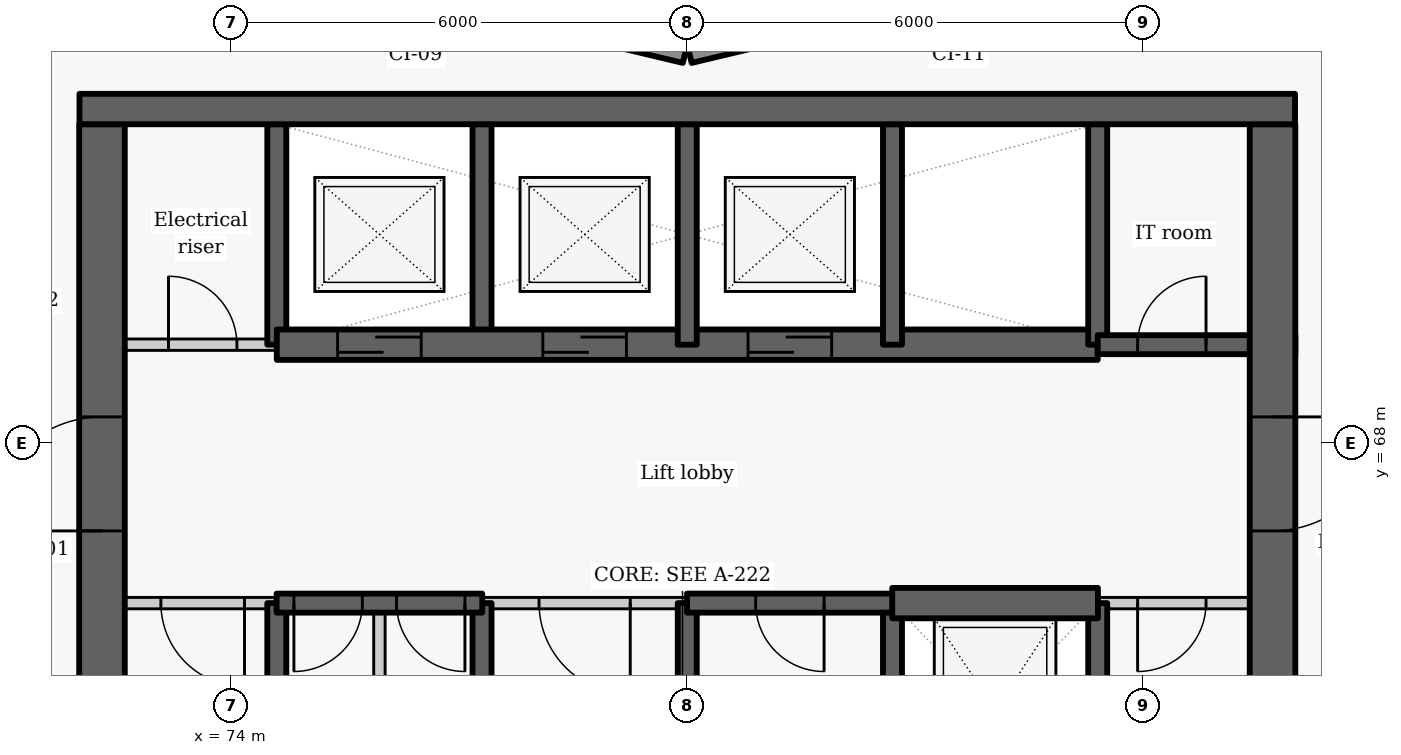
"""IFC4 building model, lengths in metres.
Left out: names, types, materials, properties, quantities, classifications, styles, units other than length and angle.
Written with IfcOpenShell. Run it as: python <this file> out.ifc"""

import sys

from ifc_helpers import new_model, si_unit, direction, frame, frame_2d, origin, place, context, subcontext, project, spatial, rectangle, extrude, element, fill, save


model = new_model("IFC4")
c1 = context("Model", 3, precision=1e-05, world=origin(), true_north=direction((0.0, 1.0)))
c2 = subcontext(c1, "Body", "Model", "MODEL_VIEW")
j1 = project(units=[si_unit("LENGTHUNIT", "METRE"), si_unit("PLANEANGLEUNIT", "RADIAN")], contexts=[c1])
p1 = place(None, origin())
s1 = spatial("IfcSite", under=j1, at=p1, CompositionType="ELEMENT")
p2 = place(p1, origin())
s2 = spatial("IfcBuilding", under=s1, at=p2, CompositionType="ELEMENT")
p3 = place(p2, frame((0.0, 0.0, 117.3)))
s3 = spatial("IfcBuildingStorey", under=s2, at=p3, CompositionType="ELEMENT", Elevation=117.3)
for number, where, z_axis, x_axis in (
    (1, (83.186, 73.881, 0.0), (0.0, 0.0, 1.0), (-0.973, -0.232, 0.0)),
    (2, (79.971, 73.128, 0.0), (0.0, 0.0, 1.0), (-0.973, 0.232, 0.0)),
):
    element("IfcWall", number, at=place(p3, frame(where, z_axis=z_axis, x_axis=x_axis)), inside=s3, PredefinedType="SOLIDWALL", context=c2, shape_type="SweptSolid", body=[
        extrude(rectangle(XDim=3.246, YDim=0.25, at=frame_2d((1.623, 0.0))), origin(), (0.0, 0.0, 1.0), 2.05),
    ])
p4 = place(p3, frame((74.6, 63.1, -0.275), z_axis=(0.0, 0.0, 1.0), x_axis=(0.0, 1.0, 0.0)))
e3 = element("IfcWall", 3, at=p4, inside=s3, PredefinedType="SHEAR", context=c2, shape_type="SweptSolid", body=[
    extrude(rectangle(XDim=2.8, YDim=0.25, at=frame_2d((1.4, 0.0))), origin(), (0.0, 0.0, 1.0), 3.225),
])
p5 = place(p3, frame((74.6, 69.3, -0.275), z_axis=(0.0, 0.0, 1.0), x_axis=(0.0, 1.0, 0.0)))
e4 = element("IfcWall", 4, at=p5, inside=s3, PredefinedType="SHEAR", context=c2, shape_type="SweptSolid", body=[
    extrude(rectangle(XDim=2.9, YDim=0.25, at=frame_2d((1.45, 0.0))), origin(), (0.0, 0.0, 1.0), 3.225),
])
p6 = place(p3, frame((72.0, 69.3, 0.0), z_axis=(0.0, 0.0, 1.0), x_axis=(1.0, 0.0, 0.0)))
e5 = element("IfcWall", 5, at=p6, inside=s3, PredefinedType="PARTITIONING", context=c2, shape_type="SweptSolid", body=[
    extrude(rectangle(XDim=2.6, YDim=0.15, at=frame_2d((1.3, 0.0))), origin(), (0.0, 0.0, 1.0), 2.95),
])
p7 = place(p6, frame((1.175, 0.0, 0.0)))
e6 = element("IfcOpeningElement", 6, at=p7, cuts=e5, PredefinedType="OPENING", context=c2, shape_type="SweptSolid", body=[
    extrude(rectangle(XDim=0.9, YDim=2.1, at=frame_2d((0.45, 1.05))), frame((0.0, 0.085, 0.0), z_axis=(0.0, -1.0, 0.0), x_axis=(1.0, 0.0, 0.0)), (0.0, 0.0, 1.0), 0.17),
])
p8 = place(p3, frame((72.3, 63.1, -0.275), z_axis=(0.0, 0.0, 1.0), x_axis=(0.0, 1.0, 0.0)))
e7 = element("IfcWall", 7, at=p8, inside=s3, PredefinedType="SHEAR", context=c2, shape_type="SweptSolid", body=[
    extrude(rectangle(XDim=9.1, YDim=0.6, at=frame_2d((4.55, 0.0))), origin(), (0.0, 0.0, 1.0), 3.225),
])
p9 = place(p8, frame((3.75, 0.0, 0.275)))
e8 = element("IfcOpeningElement", 8, at=p9, cuts=e7, PredefinedType="OPENING", context=c2, shape_type="SweptSolid", body=[
    extrude(rectangle(XDim=1.5, YDim=2.1, at=frame_2d((0.75, 1.05))), frame((0.0, 0.31, 0.0), z_axis=(0.0, -1.0, 0.0), x_axis=(1.0, 0.0, 0.0)), (0.0, 0.0, 1.0), 0.62),
])
p10 = place(p3, frame((77.3, 63.1, -0.275), z_axis=(0.0, 0.0, 1.0), x_axis=(0.0, 1.0, 0.0)))
e9 = element("IfcWall", 9, at=p10, inside=s3, PredefinedType="SHEAR", context=c2, shape_type="SweptSolid", body=[
    extrude(rectangle(XDim=2.8, YDim=0.25, at=frame_2d((1.4, 0.0))), origin(), (0.0, 0.0, 1.0), 3.225),
])
p11 = place(p3, frame((77.3, 69.3, -0.275), z_axis=(0.0, 0.0, 1.0), x_axis=(0.0, 1.0, 0.0)))
e10 = element("IfcWall", 10, at=p11, inside=s3, PredefinedType="SHEAR", context=c2, shape_type="SweptSolid", body=[
    extrude(rectangle(XDim=2.9, YDim=0.25, at=frame_2d((1.45, 0.0))), origin(), (0.0, 0.0, 1.0), 3.225),
])
p12 = place(p3, frame((74.6, 69.3, -0.275), z_axis=(0.0, 0.0, 1.0), x_axis=(1.0, 0.0, 0.0)))
e11 = element("IfcWall", 11, at=p12, inside=s3, PredefinedType="SHEAR", context=c2, shape_type="SweptSolid", body=[
    extrude(rectangle(XDim=10.8, YDim=0.4, at=frame_2d((5.4, 0.0))), origin(), (0.0, 0.0, 1.0), 3.225),
])
p13 = place(p12, frame((0.8, 0.0, 0.275)))
e12 = element("IfcOpeningElement", 12, at=p13, cuts=e11, PredefinedType="OPENING", context=c2, shape_type="SweptSolid", body=[
    extrude(rectangle(XDim=1.1, YDim=2.1, at=frame_2d((0.55, 1.05))), frame((0.0, 0.21, 0.0), z_axis=(0.0, -1.0, 0.0), x_axis=(1.0, 0.0, 0.0)), (0.0, 0.0, 1.0), 0.42),
])
p14 = place(p12, frame((3.5, 0.0, 0.275)))
e13 = element("IfcOpeningElement", 13, at=p14, cuts=e11, PredefinedType="OPENING", context=c2, shape_type="SweptSolid", body=[
    extrude(rectangle(XDim=1.1, YDim=2.1, at=frame_2d((0.55, 1.05))), frame((0.0, 0.21, 0.0), z_axis=(0.0, -1.0, 0.0), x_axis=(1.0, 0.0, 0.0)), (0.0, 0.0, 1.0), 0.42),
])
p15 = place(p12, frame((6.2, 0.0, 0.275)))
e14 = element("IfcOpeningElement", 14, at=p15, cuts=e11, PredefinedType="OPENING", context=c2, shape_type="SweptSolid", body=[
    extrude(rectangle(XDim=1.1, YDim=2.1, at=frame_2d((0.55, 1.05))), frame((0.0, 0.21, 0.0), z_axis=(0.0, -1.0, 0.0), x_axis=(1.0, 0.0, 0.0)), (0.0, 0.0, 1.0), 0.42),
])
p16 = place(p3, frame((80.0, 63.1, -0.275), z_axis=(0.0, 0.0, 1.0), x_axis=(0.0, 1.0, 0.0)))
e15 = element("IfcWall", 15, at=p16, inside=s3, PredefinedType="SHEAR", context=c2, shape_type="SweptSolid", body=[
    extrude(rectangle(XDim=2.8, YDim=0.25, at=frame_2d((1.4, 0.0))), origin(), (0.0, 0.0, 1.0), 3.225),
])
p17 = place(p3, frame((80.0, 69.3, -0.275), z_axis=(0.0, 0.0, 1.0), x_axis=(0.0, 1.0, 0.0)))
e16 = element("IfcWall", 16, at=p17, inside=s3, PredefinedType="SHEAR", context=c2, shape_type="SweptSolid", body=[
    extrude(rectangle(XDim=2.9, YDim=0.25, at=frame_2d((1.45, 0.0))), origin(), (0.0, 0.0, 1.0), 3.225),
])
p18 = place(p3, frame((82.7, 63.1, -0.275), z_axis=(0.0, 0.0, 1.0), x_axis=(0.0, 1.0, 0.0)))
e17 = element("IfcWall", 17, at=p18, inside=s3, PredefinedType="SHEAR", context=c2, shape_type="SweptSolid", body=[
    extrude(rectangle(XDim=2.8, YDim=0.25, at=frame_2d((1.4, 0.0))), origin(), (0.0, 0.0, 1.0), 3.225),
])
p19 = place(p3, frame((82.7, 69.3, -0.275), z_axis=(0.0, 0.0, 1.0), x_axis=(0.0, 1.0, 0.0)))
e18 = element("IfcWall", 18, at=p19, inside=s3, PredefinedType="SHEAR", context=c2, shape_type="SweptSolid", body=[
    extrude(rectangle(XDim=2.9, YDim=0.25, at=frame_2d((1.45, 0.0))), origin(), (0.0, 0.0, 1.0), 3.225),
])
p20 = place(p3, frame((85.4, 63.1, -0.275), z_axis=(0.0, 0.0, 1.0), x_axis=(0.0, 1.0, 0.0)))
e19 = element("IfcWall", 19, at=p20, inside=s3, PredefinedType="SHEAR", context=c2, shape_type="SweptSolid", body=[
    extrude(rectangle(XDim=2.8, YDim=0.25, at=frame_2d((1.4, 0.0))), origin(), (0.0, 0.0, 1.0), 3.225),
])
p21 = place(p3, frame((85.4, 69.3, -0.275), z_axis=(0.0, 0.0, 1.0), x_axis=(0.0, 1.0, 0.0)))
e20 = element("IfcWall", 20, at=p21, inside=s3, PredefinedType="SHEAR", context=c2, shape_type="SweptSolid", body=[
    extrude(rectangle(XDim=2.9, YDim=0.25, at=frame_2d((1.45, 0.0))), origin(), (0.0, 0.0, 1.0), 3.225),
])
p22 = place(p3, frame((85.4, 69.3, -0.275), z_axis=(0.0, 0.0, 1.0), x_axis=(1.0, 0.0, 0.0)))
e21 = element("IfcWall", 21, at=p22, inside=s3, PredefinedType="SHEAR", context=c2, shape_type="SweptSolid", body=[
    extrude(rectangle(XDim=2.6, YDim=0.25, at=frame_2d((1.3, 0.0))), origin(), (0.0, 0.0, 1.0), 3.225),
])
p23 = place(p22, frame((0.525, 0.0, 0.275)))
e22 = element("IfcOpeningElement", 22, at=p23, cuts=e21, PredefinedType="OPENING", context=c2, shape_type="SweptSolid", body=[
    extrude(rectangle(XDim=0.9, YDim=2.1, at=frame_2d((0.45, 1.05))), frame((0.0, 0.135, 0.0), z_axis=(0.0, -1.0, 0.0), x_axis=(1.0, 0.0, 0.0)), (0.0, 0.0, 1.0), 0.27),
])
p24 = place(p3, frame((87.7, 72.2, -0.275), z_axis=(0.0, 0.0, 1.0), x_axis=(0.0, -1.0, 0.0)))
e23 = element("IfcWall", 23, at=p24, inside=s3, PredefinedType="SHEAR", context=c2, shape_type="SweptSolid", body=[
    extrude(rectangle(XDim=15.6, YDim=0.6, at=frame_2d((7.8, 0.0))), origin(), (0.0, 0.0, 1.0), 3.225),
])
p25 = place(p24, frame((3.85, 0.0, 0.275)))
e24 = element("IfcOpeningElement", 24, at=p25, cuts=e23, PredefinedType="OPENING", context=c2, shape_type="SweptSolid", body=[
    extrude(rectangle(XDim=1.5, YDim=2.1, at=frame_2d((0.75, 1.05))), frame((0.0, 0.31, 0.0), z_axis=(0.0, -1.0, 0.0), x_axis=(1.0, 0.0, 0.0)), (0.0, 0.0, 1.0), 0.62),
])
p26 = place(p24, frame((11.8, 0.0, 0.275)))
e25 = element("IfcOpeningElement", 25, at=p26, cuts=e23, PredefinedType="OPENING", context=c2, shape_type="SweptSolid", body=[
    extrude(rectangle(XDim=1.1, YDim=2.1, at=frame_2d((0.55, 1.05))), frame((0.0, 0.31, 0.0), z_axis=(0.0, -1.0, 0.0), x_axis=(1.0, 0.0, 0.0)), (0.0, 0.0, 1.0), 0.62),
])
p27 = place(p3, frame((74.603, 65.9, 0.0), z_axis=(0.0, 0.0, 1.0), x_axis=(-1.0, 0.0, 0.0)))
e26 = element("IfcWall", 26, at=p27, inside=s3, PredefinedType="PARTITIONING", context=c2, shape_type="SweptSolid", body=[
    extrude(rectangle(XDim=2.603, YDim=0.15, at=frame_2d((1.302, 0.0))), origin(), (0.0, 0.0, 1.0), 2.95),
])
p28 = place(p27, frame((0.428, 0.0, 0.0)))
e27 = element("IfcOpeningElement", 27, at=p28, cuts=e26, PredefinedType="OPENING", context=c2, shape_type="SweptSolid", body=[
    extrude(rectangle(XDim=1.1, YDim=2.1, at=frame_2d((0.55, 1.05))), frame((0.0, 0.085, 0.0), z_axis=(0.0, -1.0, 0.0), x_axis=(1.0, 0.0, 0.0)), (0.0, 0.0, 1.0), 0.17),
])
p29 = place(p3, frame((80.003, 65.9, 0.0), z_axis=(0.0, 0.0, 1.0), x_axis=(-1.0, 0.0, 0.0)))
e28 = element("IfcWall", 28, at=p29, inside=s3, PredefinedType="PARTITIONING", context=c2, shape_type="SweptSolid", body=[
    extrude(rectangle(XDim=2.706, YDim=0.15, at=frame_2d((1.353, 0.0))), origin(), (0.0, 0.0, 1.0), 2.95),
])
p30 = place(p29, frame((0.753, 0.0, 0.0)))
e29 = element("IfcOpeningElement", 29, at=p30, cuts=e28, PredefinedType="OPENING", context=c2, shape_type="SweptSolid", body=[
    extrude(rectangle(XDim=1.2, YDim=2.1, at=frame_2d((0.6, 1.05))), frame((0.0, 0.085, 0.0), z_axis=(0.0, -1.0, 0.0), x_axis=(1.0, 0.0, 0.0)), (0.0, 0.0, 1.0), 0.17),
])
p31 = place(p3, frame((88.0, 65.9, 0.0), z_axis=(0.0, 0.0, 1.0), x_axis=(-1.0, 0.0, 0.0)))
e30 = element("IfcWall", 30, at=p31, inside=s3, PredefinedType="PARTITIONING", context=c2, shape_type="SweptSolid", body=[
    extrude(rectangle(XDim=2.603, YDim=0.15, at=frame_2d((1.302, 0.0))), origin(), (0.0, 0.0, 1.0), 2.95),
])
p32 = place(p31, frame((1.175, 0.0, 0.0)))
e31 = element("IfcOpeningElement", 31, at=p32, cuts=e30, PredefinedType="OPENING", context=c2, shape_type="SweptSolid", body=[
    extrude(rectangle(XDim=0.9, YDim=2.1, at=frame_2d((0.45, 1.05))), frame((0.0, 0.085, 0.0), z_axis=(0.0, -1.0, 0.0), x_axis=(1.0, 0.0, 0.0)), (0.0, 0.0, 1.0), 0.17),
])
p33 = place(p3, frame((77.303, 65.9, -0.275), z_axis=(0.0, 0.0, 1.0), x_axis=(-1.0, 0.0, 0.0)))
e32 = element("IfcWall", 32, at=p33, inside=s3, PredefinedType="SHEAR", context=c2, shape_type="SweptSolid", body=[
    extrude(rectangle(XDim=2.706, YDim=0.25, at=frame_2d((1.353, 0.0))), origin(), (0.0, 0.0, 1.0), 3.225),
])
p34 = place(p33, frame((1.578, 0.0, 0.275)))
e33 = element("IfcOpeningElement", 33, at=p34, cuts=e32, PredefinedType="OPENING", context=c2, shape_type="SweptSolid", body=[
    extrude(rectangle(XDim=0.9, YDim=2.1, at=frame_2d((0.45, 1.05))), frame((0.0, 0.135, 0.0), z_axis=(0.0, -1.0, 0.0), x_axis=(1.0, 0.0, 0.0)), (0.0, 0.0, 1.0), 0.27),
])
p35 = place(p33, frame((0.228, 0.0, 0.275)))
e34 = element("IfcOpeningElement", 34, at=p35, cuts=e32, PredefinedType="OPENING", context=c2, shape_type="SweptSolid", body=[
    extrude(rectangle(XDim=0.9, YDim=2.1, at=frame_2d((0.45, 1.05))), frame((0.0, 0.135, 0.0), z_axis=(0.0, -1.0, 0.0), x_axis=(1.0, 0.0, 0.0)), (0.0, 0.0, 1.0), 0.27),
])
p36 = place(p3, frame((82.703, 65.9, -0.275), z_axis=(0.0, 0.0, 1.0), x_axis=(-1.0, 0.0, 0.0)))
e35 = element("IfcWall", 35, at=p36, inside=s3, PredefinedType="SHEAR", context=c2, shape_type="SweptSolid", body=[
    extrude(rectangle(XDim=2.706, YDim=0.25, at=frame_2d((1.353, 0.0))), origin(), (0.0, 0.0, 1.0), 3.225),
])
p37 = place(p36, frame((0.903, 0.0, 0.275)))
e36 = element("IfcOpeningElement", 36, at=p37, cuts=e35, PredefinedType="OPENING", context=c2, shape_type="SweptSolid", body=[
    extrude(rectangle(XDim=0.9, YDim=2.1, at=frame_2d((0.45, 1.05))), frame((0.0, 0.135, 0.0), z_axis=(0.0, -1.0, 0.0), x_axis=(1.0, 0.0, 0.0)), (0.0, 0.0, 1.0), 0.27),
])
p38 = place(p3, frame((82.697, 65.9, -0.275), z_axis=(0.0, 0.0, 1.0), x_axis=(1.0, 0.0, 0.0)))
e37 = element("IfcWall", 37, at=p38, inside=s3, PredefinedType="SHEAR", context=c2, shape_type="SweptSolid", body=[
    extrude(rectangle(XDim=2.706, YDim=0.4, at=frame_2d((1.353, 0.0))), origin(), (0.0, 0.0, 1.0), 3.225),
])
p39 = place(p3, frame((75.95, 63.1, 0.0), z_axis=(0.0, 0.0, 1.0), x_axis=(0.0, 1.0, 0.0)))
e38 = element("IfcWall", 38, at=p39, inside=s3, PredefinedType="PARTITIONING", context=c2, shape_type="SweptSolid", body=[
    extrude(rectangle(XDim=2.8, YDim=0.15, at=frame_2d((1.4, 0.0))), origin(), (0.0, 0.0, 1.0), 2.95),
])
p40 = place(p3, frame((72.004, 72.4, -0.275), z_axis=(0.0, 0.0, 1.0), x_axis=(1.0, 0.0, 0.0)))
e39 = element("IfcWall", 39, at=p40, inside=s3, PredefinedType="SHEAR", context=c2, shape_type="SweptSolid", body=[
    extrude(rectangle(XDim=15.992, YDim=0.4, at=frame_2d((7.996, 0.0))), origin(), (0.0, 0.0, 1.0), 3.225),
])
p41 = place(p7, origin())
e40 = element("IfcDoor", 40, at=p41, inside=s3, OperationType="SINGLE_SWING_LEFT", PredefinedType="DOOR", context=c2, shape_type="SweptSolid", body=[
    extrude(rectangle(XDim=0.9, YDim=2.1, at=frame_2d((0.45, 1.05))), frame((0.0, 0.025, 0.0), z_axis=(0.0, -1.0, 0.0), x_axis=(1.0, 0.0, 0.0)), (0.0, 0.0, 1.0), 0.05),
])
fill(e6, e40)
p42 = place(p13, origin())
e41 = element("IfcDoor", 41, at=p42, inside=s3, OperationType="SLIDING_TO_LEFT", PredefinedType="DOOR", context=c2, shape_type="SweptSolid", body=[
    extrude(rectangle(XDim=1.1, YDim=2.1, at=frame_2d((0.55, 1.05))), frame((0.0, 0.025, 0.0), z_axis=(0.0, -1.0, 0.0), x_axis=(1.0, 0.0, 0.0)), (0.0, 0.0, 1.0), 0.05),
])
fill(e12, e41)
p43 = place(p14, origin())
e42 = element("IfcDoor", 42, at=p43, inside=s3, OperationType="SLIDING_TO_LEFT", PredefinedType="DOOR", context=c2, shape_type="SweptSolid", body=[
    extrude(rectangle(XDim=1.1, YDim=2.1, at=frame_2d((0.55, 1.05))), frame((0.0, 0.025, 0.0), z_axis=(0.0, -1.0, 0.0), x_axis=(1.0, 0.0, 0.0)), (0.0, 0.0, 1.0), 0.05),
])
fill(e13, e42)
p44 = place(p15, origin())
e43 = element("IfcDoor", 43, at=p44, inside=s3, OperationType="SLIDING_TO_LEFT", PredefinedType="DOOR", context=c2, shape_type="SweptSolid", body=[
    extrude(rectangle(XDim=1.1, YDim=2.1, at=frame_2d((0.55, 1.05))), frame((0.0, 0.025, 0.0), z_axis=(0.0, -1.0, 0.0), x_axis=(1.0, 0.0, 0.0)), (0.0, 0.0, 1.0), 0.05),
])
fill(e14, e43)
p45 = place(p23, origin())
e44 = element("IfcDoor", 44, at=p45, inside=s3, OperationType="SINGLE_SWING_RIGHT", PredefinedType="DOOR", context=c2, shape_type="SweptSolid", body=[
    extrude(rectangle(XDim=0.9, YDim=2.1, at=frame_2d((0.45, 1.05))), frame((0.0, 0.025, 0.0), z_axis=(0.0, -1.0, 0.0), x_axis=(1.0, 0.0, 0.0)), (0.0, 0.0, 1.0), 0.05),
])
fill(e22, e44)
p46 = place(p28, origin())
e45 = element("IfcDoor", 45, at=p46, inside=s3, OperationType="SINGLE_SWING_LEFT", PredefinedType="DOOR", context=c2, shape_type="SweptSolid", body=[
    extrude(rectangle(XDim=1.1, YDim=2.1, at=frame_2d((0.55, 1.05))), frame((0.0, 0.025, 0.0), z_axis=(0.0, -1.0, 0.0), x_axis=(1.0, 0.0, 0.0)), (0.0, 0.0, 1.0), 0.05),
])
fill(e27, e45)
p47 = place(p34, origin())
e46 = element("IfcDoor", 46, at=p47, inside=s3, OperationType="SINGLE_SWING_RIGHT", PredefinedType="DOOR", context=c2, shape_type="SweptSolid", body=[
    extrude(rectangle(XDim=0.9, YDim=2.1, at=frame_2d((0.45, 1.05))), frame((0.0, 0.025, 0.0), z_axis=(0.0, -1.0, 0.0), x_axis=(1.0, 0.0, 0.0)), (0.0, 0.0, 1.0), 0.05),
])
fill(e33, e46)
p48 = place(p35, origin())
e47 = element("IfcDoor", 47, at=p48, inside=s3, OperationType="SINGLE_SWING_LEFT", PredefinedType="DOOR", context=c2, shape_type="SweptSolid", body=[
    extrude(rectangle(XDim=0.9, YDim=2.1, at=frame_2d((0.45, 1.05))), frame((0.0, 0.025, 0.0), z_axis=(0.0, -1.0, 0.0), x_axis=(1.0, 0.0, 0.0)), (0.0, 0.0, 1.0), 0.05),
])
fill(e34, e47)
p49 = place(p30, origin())
e48 = element("IfcDoor", 48, at=p49, inside=s3, OperationType="DOUBLE_DOOR_SINGLE_SWING", PredefinedType="DOOR", context=c2, shape_type="SweptSolid", body=[
    extrude(rectangle(XDim=1.2, YDim=2.1, at=frame_2d((0.6, 1.05))), frame((0.0, 0.025, 0.0), z_axis=(0.0, -1.0, 0.0), x_axis=(1.0, 0.0, 0.0)), (0.0, 0.0, 1.0), 0.05),
])
fill(e29, e48)
p50 = place(p37, origin())
e49 = element("IfcDoor", 49, at=p50, inside=s3, OperationType="SINGLE_SWING_LEFT", PredefinedType="DOOR", context=c2, shape_type="SweptSolid", body=[
    extrude(rectangle(XDim=0.9, YDim=2.1, at=frame_2d((0.45, 1.05))), frame((0.0, 0.025, 0.0), z_axis=(0.0, -1.0, 0.0), x_axis=(1.0, 0.0, 0.0)), (0.0, 0.0, 1.0), 0.05),
])
fill(e36, e49)
p51 = place(p32, origin())
e50 = element("IfcDoor", 50, at=p51, inside=s3, OperationType="SINGLE_SWING_RIGHT", PredefinedType="DOOR", context=c2, shape_type="SweptSolid", body=[
    extrude(rectangle(XDim=0.9, YDim=2.1, at=frame_2d((0.45, 1.05))), frame((0.0, 0.025, 0.0), z_axis=(0.0, -1.0, 0.0), x_axis=(1.0, 0.0, 0.0)), (0.0, 0.0, 1.0), 0.05),
])
fill(e31, e50)
p52 = place(p25, origin())
e51 = element("IfcDoor", 51, at=p52, inside=s3, OperationType="DOUBLE_DOOR_SINGLE_SWING", PredefinedType="DOOR", context=c2, shape_type="SweptSolid", body=[
    extrude(rectangle(XDim=1.5, YDim=2.1, at=frame_2d((0.75, 1.05))), frame((0.0, 0.025, 0.0), z_axis=(0.0, -1.0, 0.0), x_axis=(1.0, 0.0, 0.0)), (0.0, 0.0, 1.0), 0.05),
])
fill(e24, e51)
p53 = place(p9, origin())
e52 = element("IfcDoor", 52, at=p53, inside=s3, OperationType="DOUBLE_DOOR_SINGLE_SWING", PredefinedType="DOOR", context=c2, shape_type="SweptSolid", body=[
    extrude(rectangle(XDim=1.5, YDim=2.1, at=frame_2d((0.75, 1.05))), frame((0.0, 0.025, 0.0), z_axis=(0.0, -1.0, 0.0), x_axis=(1.0, 0.0, 0.0)), (0.0, 0.0, 1.0), 0.05),
])
fill(e8, e52)
save(model, sys.argv[1])
